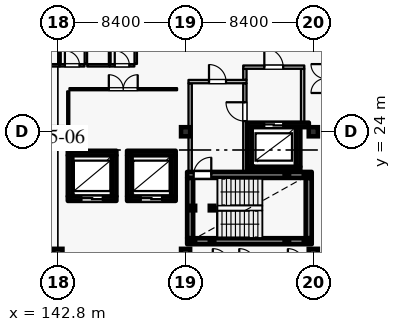
"""IFC4 building model, lengths in metres.
Left out: names, types, materials, properties, quantities, classifications, styles, units other than length and angle.
Written with IfcOpenShell. Run it as: python <this file> out.ifc"""

import sys

from ifc_helpers import new_model, si_unit, direction, frame, frame_2d, origin, origin_2d, place, context, subcontext, project, spatial, rectangle, hollow_rectangle, extrude, element, fill, save


model = new_model("IFC4")
c1 = context("Model", 3, precision=1e-05, world=origin(), true_north=direction((0.0, 1.0)))
c2 = subcontext(c1, "Body", "Model", "MODEL_VIEW")
j1 = project(units=[si_unit("LENGTHUNIT", "METRE"), si_unit("PLANEANGLEUNIT", "RADIAN")], contexts=[c1])
p1 = place(None, origin())
s1 = spatial("IfcSite", under=j1, at=p1, CompositionType="ELEMENT")
p2 = place(p1, origin())
s2 = spatial("IfcBuilding", under=s1, at=p2, CompositionType="ELEMENT")
p3 = place(p2, frame((0.0, 0.0, 39.6)))
s3 = spatial("IfcBuildingStorey", under=s2, at=p3, CompositionType="ELEMENT", Elevation=39.6)
for number, where, z_axis, x_axis in (
    (1, (142.8, 16.0, 0.0), (0.0, 0.0, 1.0), (1.0, 0.0, 0.0)),
    (2, (151.2, 24.0, 0.0), (0.0, 0.0, 1.0), (1.0, 0.0, 0.0)),
    (3, (159.6, 24.0, 0.0), (0.0, 0.0, 1.0), (1.0, 0.0, 0.0)),
    (4, (142.8, 24.0, 0.0), (0.0, 0.0, 1.0), (1.0, 0.0, 0.0)),
    (5, (151.2, 16.0, 0.0), (0.0, 0.0, 1.0), (1.0, 0.0, 0.0)),
    (6, (159.6, 16.0, 0.0), (0.0, 0.0, 1.0), (1.0, 0.0, 0.0)),
):
    element("IfcColumn", number, at=place(p3, frame(where, z_axis=z_axis, x_axis=x_axis)), inside=s3, PredefinedType="COLUMN", context=c2, shape_type="SweptSolid", body=[
        extrude(rectangle(XDim=0.6, YDim=0.6, at=origin_2d()), origin(), (0.0, 0.0, 1.0), 3.6),
    ])
p4 = place(p3, frame((155.25, 21.55, 0.0), z_axis=(0.0, 0.0, 1.0), x_axis=(1.0, 0.0, 0.0)))
e7 = element("IfcWall", 7, at=p4, inside=s3, PredefinedType="SHEAR", context=c2, shape_type="SweptSolid", body=[
    extrude(rectangle(XDim=3.5, YDim=0.3, at=frame_2d((1.75, 0.0))), origin(), (0.0, 0.0, 1.0), 3.335),
])
p5 = place(p3, frame((158.6, 21.705, 0.0), z_axis=(0.0, 0.0, 1.0), x_axis=(0.0, 1.0, 0.0)))
e8 = element("IfcWall", 8, at=p5, inside=s3, PredefinedType="SHEAR", context=c2, shape_type="SweptSolid", body=[
    extrude(rectangle(XDim=2.59, YDim=0.3, at=frame_2d((1.295, 0.0))), origin(), (0.0, 0.0, 1.0), 3.335),
])
p6 = place(p3, frame((159.31, 24.45, 0.0), z_axis=(0.0, 0.0, 1.0), x_axis=(-1.0, 0.0, 0.0)))
e9 = element("IfcWall", 9, at=p6, inside=s3, PredefinedType="SHEAR", context=c2, shape_type="SweptSolid", body=[
    extrude(rectangle(XDim=4.06, YDim=0.3, at=frame_2d((2.03, 0.0))), origin(), (0.0, 0.0, 1.0), 3.335),
])
p7 = place(p6, frame((1.685, 0.0, 0.0)))
e10 = element("IfcOpeningElement", 10, at=p7, cuts=e9, PredefinedType="OPENING", context=c2, shape_type="SweptSolid", body=[
    extrude(rectangle(XDim=1.25, YDim=2.25, at=frame_2d((0.625, 1.125))), frame((0.0, 0.16, 0.0), z_axis=(0.0, -1.0, 0.0), x_axis=(1.0, 0.0, 0.0)), (0.0, 0.0, 1.0), 0.32),
])
p8 = place(p3, frame((155.4, 24.295, 0.0), z_axis=(0.0, 0.0, 1.0), x_axis=(0.0, -1.0, 0.0)))
e11 = element("IfcWall", 11, at=p8, inside=s3, PredefinedType="SHEAR", context=c2, shape_type="SweptSolid", body=[
    extrude(rectangle(XDim=2.59, YDim=0.3, at=frame_2d((1.295, 0.0))), origin(), (0.0, 0.0, 1.0), 3.335),
])
p9 = place(p3, frame((143.45, 19.6, 0.0), z_axis=(0.0, 0.0, 1.0), x_axis=(1.0, 0.0, 0.0)))
e12 = element("IfcWall", 12, at=p9, inside=s3, PredefinedType="SHEAR", context=c2, shape_type="SweptSolid", body=[
    extrude(rectangle(XDim=3.2, YDim=0.3, at=frame_2d((1.6, 0.0))), origin(), (0.0, 0.0, 1.0), 3.335),
])
p10 = place(p9, frame((0.9, 0.0, 0.0)))
e13 = element("IfcOpeningElement", 13, at=p10, cuts=e12, PredefinedType="OPENING", context=c2, shape_type="SweptSolid", body=[
    extrude(rectangle(XDim=1.4, YDim=2.35, at=frame_2d((0.7, 1.175))), frame((0.0, 0.16, 0.0), z_axis=(0.0, -1.0, 0.0), x_axis=(1.0, 0.0, 0.0)), (0.0, 0.0, 1.0), 0.32),
])
p11 = place(p3, frame((146.5, 19.755, 0.0), z_axis=(0.0, 0.0, 1.0), x_axis=(0.0, 1.0, 0.0)))
e14 = element("IfcWall", 14, at=p11, inside=s3, PredefinedType="SHEAR", context=c2, shape_type="SweptSolid", body=[
    extrude(rectangle(XDim=2.69, YDim=0.3, at=frame_2d((1.345, 0.0))), origin(), (0.0, 0.0, 1.0), 3.335),
])
p12 = place(p3, frame((146.65, 22.6, 0.0), z_axis=(0.0, 0.0, 1.0), x_axis=(-1.0, 0.0, 0.0)))
e15 = element("IfcWall", 15, at=p12, inside=s3, PredefinedType="SHEAR", context=c2, shape_type="SweptSolid", body=[
    extrude(rectangle(XDim=3.2, YDim=0.3, at=frame_2d((1.6, 0.0))), origin(), (0.0, 0.0, 1.0), 3.335),
])
p13 = place(p3, frame((143.6, 22.445, 0.0), z_axis=(0.0, 0.0, 1.0), x_axis=(0.0, -1.0, 0.0)))
e16 = element("IfcWall", 16, at=p13, inside=s3, PredefinedType="SHEAR", context=c2, shape_type="SweptSolid", body=[
    extrude(rectangle(XDim=2.69, YDim=0.3, at=frame_2d((1.345, 0.0))), origin(), (0.0, 0.0, 1.0), 3.335),
])
p14 = place(p3, frame((147.35, 19.6, 0.0), z_axis=(0.0, 0.0, 1.0), x_axis=(1.0, 0.0, 0.0)))
e17 = element("IfcWall", 17, at=p14, inside=s3, PredefinedType="SHEAR", context=c2, shape_type="SweptSolid", body=[
    extrude(rectangle(XDim=3.2, YDim=0.3, at=frame_2d((1.6, 0.0))), origin(), (0.0, 0.0, 1.0), 3.335),
])
p15 = place(p14, frame((0.9, 0.0, 0.0)))
e18 = element("IfcOpeningElement", 18, at=p15, cuts=e17, PredefinedType="OPENING", context=c2, shape_type="SweptSolid", body=[
    extrude(rectangle(XDim=1.4, YDim=2.35, at=frame_2d((0.7, 1.175))), frame((0.0, 0.16, 0.0), z_axis=(0.0, -1.0, 0.0), x_axis=(1.0, 0.0, 0.0)), (0.0, 0.0, 1.0), 0.32),
])
p16 = place(p3, frame((150.4, 19.755, 0.0), z_axis=(0.0, 0.0, 1.0), x_axis=(0.0, 1.0, 0.0)))
e19 = element("IfcWall", 19, at=p16, inside=s3, PredefinedType="SHEAR", context=c2, shape_type="SweptSolid", body=[
    extrude(rectangle(XDim=2.69, YDim=0.3, at=frame_2d((1.345, 0.0))), origin(), (0.0, 0.0, 1.0), 3.335),
])
p17 = place(p3, frame((150.55, 22.6, 0.0), z_axis=(0.0, 0.0, 1.0), x_axis=(-1.0, 0.0, 0.0)))
e20 = element("IfcWall", 20, at=p17, inside=s3, PredefinedType="SHEAR", context=c2, shape_type="SweptSolid", body=[
    extrude(rectangle(XDim=3.2, YDim=0.3, at=frame_2d((1.6, 0.0))), origin(), (0.0, 0.0, 1.0), 3.335),
])
p18 = place(p3, frame((147.5, 22.445, 0.0), z_axis=(0.0, 0.0, 1.0), x_axis=(0.0, -1.0, 0.0)))
e21 = element("IfcWall", 21, at=p18, inside=s3, PredefinedType="SHEAR", context=c2, shape_type="SweptSolid", body=[
    extrude(rectangle(XDim=2.69, YDim=0.3, at=frame_2d((1.345, 0.0))), origin(), (0.0, 0.0, 1.0), 3.335),
])
p19 = place(p3, frame((151.3, 16.8, 0.0), z_axis=(0.0, 0.0, 1.0), x_axis=(1.0, 0.0, 0.0)))
e22 = element("IfcWall", 22, at=p19, inside=s3, PredefinedType="SHEAR", context=c2, shape_type="SweptSolid", body=[
    extrude(rectangle(XDim=8.2, YDim=0.4, at=frame_2d((4.1, 0.0))), origin(), (0.0, 0.0, 1.0), 3.335),
])
p20 = place(p3, frame((159.3, 17.005, 0.0), z_axis=(0.0, 0.0, 1.0), x_axis=(0.0, 1.0, 0.0)))
e23 = element("IfcWall", 23, at=p20, inside=s3, PredefinedType="SHEAR", context=c2, shape_type="SweptSolid", body=[
    extrude(rectangle(XDim=3.95, YDim=0.4, at=frame_2d((1.975, 0.0))), origin(), (0.0, 0.0, 1.0), 3.335),
])
p21 = place(p3, frame((151.3, 21.16, 0.0), z_axis=(0.0, 0.0, 1.0), x_axis=(1.0, 0.0, 0.0)))
e24 = element("IfcWall", 24, at=p21, inside=s3, PredefinedType="SHEAR", context=c2, shape_type="SweptSolid", body=[
    extrude(rectangle(XDim=8.2, YDim=0.4, at=frame_2d((4.1, 0.0))), origin(), (0.0, 0.0, 1.0), 3.335),
])
p22 = place(p21, frame((0.43, 0.0, 0.0)))
e25 = element("IfcOpeningElement", 25, at=p22, cuts=e24, PredefinedType="OPENING", context=c2, shape_type="SweptSolid", body=[
    extrude(rectangle(XDim=1.16, YDim=2.2, at=frame_2d((0.58, 1.1))), frame((0.0, 0.21, 0.0), z_axis=(0.0, -1.0, 0.0), x_axis=(1.0, 0.0, 0.0)), (0.0, 0.0, 1.0), 0.42),
])
p23 = place(p3, frame((151.5, 17.005, 0.0), z_axis=(0.0, 0.0, 1.0), x_axis=(0.0, 1.0, 0.0)))
e26 = element("IfcWall", 26, at=p23, inside=s3, PredefinedType="SHEAR", context=c2, shape_type="SweptSolid", body=[
    extrude(rectangle(XDim=3.95, YDim=0.4, at=frame_2d((1.975, 0.0))), origin(), (0.0, 0.0, 1.0), 3.335),
])
p24 = place(p3, frame((151.5, 21.365, 0.0), z_axis=(0.0, 0.0, 1.0), x_axis=(0.0, 1.0, 0.0)))
e27 = element("IfcWall", 27, at=p24, inside=s3, PredefinedType="PARTITIONING", context=c2, shape_type="SweptSolid", body=[
    extrude(rectangle(XDim=5.82, YDim=0.22, at=frame_2d((2.91, 0.0))), origin(), (0.0, 0.0, 1.0), 3.335),
])
p25 = place(p3, frame((151.39, 27.3, 0.0), z_axis=(0.0, 0.0, 1.0), x_axis=(1.0, 0.0, 0.0)))
e28 = element("IfcWall", 28, at=p25, inside=s3, PredefinedType="PARTITIONING", context=c2, shape_type="SweptSolid", body=[
    extrude(rectangle(XDim=3.82, YDim=0.22, at=frame_2d((1.91, 0.0))), origin(), (0.0, 0.0, 1.0), 3.335),
])
p26 = place(p25, frame((1.35, 0.0, 0.0)))
e29 = element("IfcOpeningElement", 29, at=p26, cuts=e28, PredefinedType="OPENING", context=c2, shape_type="SweptSolid", body=[
    extrude(rectangle(XDim=1.12, YDim=2.2, at=frame_2d((0.56, 1.1))), frame((0.0, 0.12, 0.0), z_axis=(0.0, -1.0, 0.0), x_axis=(1.0, 0.0, 0.0)), (0.0, 0.0, 1.0), 0.24),
])
p27 = place(p3, frame((155.1, 21.365, 0.0), z_axis=(0.0, 0.0, 1.0), x_axis=(0.0, 1.0, 0.0)))
e30 = element("IfcWall", 30, at=p27, inside=s3, PredefinedType="PARTITIONING", context=c2, shape_type="SweptSolid", body=[
    extrude(rectangle(XDim=5.82, YDim=0.22, at=frame_2d((2.91, 0.0))), origin(), (0.0, 0.0, 1.0), 3.335),
])
p28 = place(p27, frame((3.335, 0.0, 0.0)))
e31 = element("IfcOpeningElement", 31, at=p28, cuts=e30, PredefinedType="OPENING", context=c2, shape_type="SweptSolid", body=[
    extrude(rectangle(XDim=1.24, YDim=2.2, at=frame_2d((0.62, 1.1))), frame((0.0, 0.12, 0.0), z_axis=(0.0, -1.0, 0.0), x_axis=(1.0, 0.0, 0.0)), (0.0, 0.0, 1.0), 0.24),
])
p29 = place(p3, frame((155.1, 27.415, 0.0), z_axis=(0.0, 0.0, 1.0), x_axis=(0.0, 1.0, 0.0)))
e32 = element("IfcWall", 32, at=p29, inside=s3, PredefinedType="PARTITIONING", context=c2, shape_type="SweptSolid", body=[
    extrude(rectangle(XDim=0.72, YDim=0.22, at=frame_2d((0.36, 0.0))), origin(), (0.0, 0.0, 1.0), 3.335),
])
p30 = place(p3, frame((158.9, 24.605, 0.0), z_axis=(0.0, 0.0, 1.0), x_axis=(0.0, 1.0, 0.0)))
e33 = element("IfcWall", 33, at=p30, inside=s3, PredefinedType="PARTITIONING", context=c2, shape_type="SweptSolid", body=[
    extrude(rectangle(XDim=3.53, YDim=0.22, at=frame_2d((1.765, 0.0))), origin(), (0.0, 0.0, 1.0), 3.335),
])
p31 = place(p3, frame((154.99, 28.25, 0.0), z_axis=(0.0, 0.0, 1.0), x_axis=(1.0, 0.0, 0.0)))
e34 = element("IfcWall", 34, at=p31, inside=s3, PredefinedType="PARTITIONING", context=c2, shape_type="SweptSolid", body=[
    extrude(rectangle(XDim=4.02, YDim=0.22, at=frame_2d((2.01, 0.0))), origin(), (0.0, 0.0, 1.0), 3.335),
])
p32 = place(p31, frame((1.39, 0.0, 0.0)))
e35 = element("IfcOpeningElement", 35, at=p32, cuts=e34, PredefinedType="OPENING", context=c2, shape_type="SweptSolid", body=[
    extrude(rectangle(XDim=1.24, YDim=2.2, at=frame_2d((0.62, 1.1))), frame((0.0, 0.12, 0.0), z_axis=(0.0, -1.0, 0.0), x_axis=(1.0, 0.0, 0.0)), (0.0, 0.0, 1.0), 0.24),
])
for number, where, z_axis, x_axis in (
    (36, (151.68, 16.8, 0.0), (0.0, 0.0, 1.0), (1.0, 0.0, 0.0)),
    (37, (151.68, 18.98, 0.0), (0.0, 0.0, 1.0), (1.0, 0.0, 0.0)),
    (38, (152.94, 16.8, 0.0), (0.0, 0.0, 1.0), (1.0, 0.0, 0.0)),
    (39, (152.94, 18.98, 0.0), (0.0, 0.0, 1.0), (1.0, 0.0, 0.0)),
    (40, (157.86, 16.8, -1.8), (0.0, 0.0, 1.0), (1.0, 0.0, 0.0)),
    (41, (157.86, 21.16, -1.8), (0.0, 0.0, 1.0), (1.0, 0.0, 0.0)),
    (42, (159.12, 16.8, -1.8), (0.0, 0.0, 1.0), (1.0, 0.0, 0.0)),
    (43, (159.12, 21.16, -1.8), (0.0, 0.0, 1.0), (1.0, 0.0, 0.0)),
):
    element("IfcColumn", number, at=place(p3, frame(where, z_axis=z_axis, x_axis=x_axis)), inside=s3, PredefinedType="COLUMN", context=c2, shape_type="SweptSolid", body=[
        extrude(hollow_rectangle(XDim=0.3, YDim=0.3, WallThickness=0.012, at=origin_2d()), origin(), (0.0, 0.0, 1.0), 3.42),
    ])
p33 = place(p3, frame((141.45, 28.37, 0.0), z_axis=(0.0, 0.0, 1.0), x_axis=(1.0, 0.0, 0.0)))
e44 = element("IfcWall", 44, at=p33, inside=s3, PredefinedType="PARTITIONING", context=c2, shape_type="SweptSolid", body=[
    extrude(rectangle(XDim=1.47, YDim=0.16, at=frame_2d((0.735, 0.0))), origin(), (0.0, 0.0, 1.0), 3.335),
])
p34 = place(p3, frame((142.93, 28.37, 0.0), z_axis=(0.0, 0.0, 1.0), x_axis=(1.0, 0.0, 0.0)))
e45 = element("IfcWall", 45, at=p34, inside=s3, PredefinedType="PARTITIONING", context=c2, shape_type="SweptSolid", body=[
    extrude(rectangle(XDim=1.62, YDim=0.16, at=frame_2d((0.81, 0.0))), origin(), (0.0, 0.0, 1.0), 3.335),
])
p35 = place(p34, frame((0.33, 0.0, 0.0)))
e46 = element("IfcOpeningElement", 46, at=p35, cuts=e45, PredefinedType="OPENING", context=c2, shape_type="SweptSolid", body=[
    extrude(rectangle(XDim=0.96, YDim=2.2, at=frame_2d((0.48, 1.1))), frame((0.0, 0.09, 0.0), z_axis=(0.0, -1.0, 0.0), x_axis=(1.0, 0.0, 0.0)), (0.0, 0.0, 1.0), 0.18),
])
p36 = place(p3, frame((142.93, 28.46, 0.0), z_axis=(0.0, 0.0, 1.0), x_axis=(0.0, 1.0, 0.0)))
e47 = element("IfcWall", 47, at=p36, inside=s3, PredefinedType="PARTITIONING", context=c2, shape_type="SweptSolid", body=[
    extrude(rectangle(XDim=1.74, YDim=0.115, at=frame_2d((0.87, 0.0))), origin(), (0.0, 0.0, 1.0), 2.74),
])
p37 = place(p3, frame((144.73, 28.37, 0.0), z_axis=(0.0, 0.0, 1.0), x_axis=(1.0, 0.0, 0.0)))
e48 = element("IfcWall", 48, at=p37, inside=s3, PredefinedType="PARTITIONING", context=c2, shape_type="SweptSolid", body=[
    extrude(rectangle(XDim=1.47, YDim=0.16, at=frame_2d((0.735, 0.0))), origin(), (0.0, 0.0, 1.0), 3.335),
])
p38 = place(p3, frame((146.21, 28.37, 0.0), z_axis=(0.0, 0.0, 1.0), x_axis=(1.0, 0.0, 0.0)))
e49 = element("IfcWall", 49, at=p38, inside=s3, PredefinedType="PARTITIONING", context=c2, shape_type="SweptSolid", body=[
    extrude(rectangle(XDim=1.62, YDim=0.16, at=frame_2d((0.81, 0.0))), origin(), (0.0, 0.0, 1.0), 3.335),
])
p39 = place(p38, frame((0.33, 0.0, 0.0)))
e50 = element("IfcOpeningElement", 50, at=p39, cuts=e49, PredefinedType="OPENING", context=c2, shape_type="SweptSolid", body=[
    extrude(rectangle(XDim=0.96, YDim=2.2, at=frame_2d((0.48, 1.1))), frame((0.0, 0.09, 0.0), z_axis=(0.0, -1.0, 0.0), x_axis=(1.0, 0.0, 0.0)), (0.0, 0.0, 1.0), 0.18),
])
p40 = place(p3, frame((146.21, 28.46, 0.0), z_axis=(0.0, 0.0, 1.0), x_axis=(0.0, 1.0, 0.0)))
e51 = element("IfcWall", 51, at=p40, inside=s3, PredefinedType="PARTITIONING", context=c2, shape_type="SweptSolid", body=[
    extrude(rectangle(XDim=2.45, YDim=0.115, at=frame_2d((1.225, 0.0))), origin(), (0.0, 0.0, 1.0), 3.335),
])
p41 = place(p3, frame((144.64, 28.46, 0.0), z_axis=(0.0, 0.0, 1.0), x_axis=(0.0, 1.0, 0.0)))
e52 = element("IfcWall", 52, at=p41, inside=s3, PredefinedType="PARTITIONING", context=c2, shape_type="SweptSolid", body=[
    extrude(rectangle(XDim=4.95, YDim=0.16, at=frame_2d((2.475, 0.0))), origin(), (0.0, 0.0, 1.0), 3.335),
])
p42 = place(p3, frame((147.92, 28.46, 0.0), z_axis=(0.0, 0.0, 1.0), x_axis=(0.0, 1.0, 0.0)))
e53 = element("IfcWall", 53, at=p42, inside=s3, PredefinedType="PARTITIONING", context=c2, shape_type="SweptSolid", body=[
    extrude(rectangle(XDim=4.44, YDim=0.16, at=frame_2d((2.22, 0.0))), origin(), (0.0, 0.0, 1.0), 3.335),
])
p43 = place(p3, frame((143.56, 26.8, 0.0), z_axis=(0.0, 0.0, 1.0), x_axis=(1.0, 0.0, 0.0)))
e54 = element("IfcWall", 54, at=p43, inside=s3, PredefinedType="PARTITIONING", context=c2, shape_type="SweptSolid", body=[
    extrude(rectangle(XDim=7.08, YDim=0.14, at=frame_2d((3.54, 0.0))), origin(), (0.0, 0.0, 1.0), 3.335),
])
p44 = place(p43, frame((2.59, 0.0, 0.0)))
e55 = element("IfcOpeningElement", 55, at=p44, cuts=e54, PredefinedType="OPENING", context=c2, shape_type="SweptSolid", body=[
    extrude(rectangle(XDim=1.9, YDim=2.4, at=frame_2d((0.95, 1.2))), frame((0.0, 0.08, 0.0), z_axis=(0.0, -1.0, 0.0), x_axis=(1.0, 0.0, 0.0)), (0.0, 0.0, 1.0), 0.16),
])
p45 = place(p3, frame((143.48, 23.45, 0.0), z_axis=(0.0, 0.0, 1.0), x_axis=(0.0, 1.0, 0.0)))
e56 = element("IfcWall", 56, at=p45, inside=s3, PredefinedType="PARTITIONING", context=c2, shape_type="SweptSolid", body=[
    extrude(rectangle(XDim=3.21, YDim=0.14, at=frame_2d((1.605, 0.0))), origin(), (0.0, 0.0, 1.0), 3.335),
])
p46 = place(p7, origin())
e57 = element("IfcDoor", 57, at=p46, inside=s3, OperationType="DOUBLE_DOOR_SLIDING", PredefinedType="DOOR", context=c2, shape_type="SweptSolid", body=[
    extrude(rectangle(XDim=1.25, YDim=2.25, at=frame_2d((0.625, 1.125))), frame((0.0, 0.025, 0.0), z_axis=(0.0, -1.0, 0.0), x_axis=(1.0, 0.0, 0.0)), (0.0, 0.0, 1.0), 0.05),
])
fill(e10, e57)
p47 = place(p10, origin())
e58 = element("IfcDoor", 58, at=p47, inside=s3, OperationType="DOUBLE_DOOR_SLIDING", PredefinedType="DOOR", context=c2, shape_type="SweptSolid", body=[
    extrude(rectangle(XDim=1.4, YDim=2.35, at=frame_2d((0.7, 1.175))), frame((0.0, 0.025, 0.0), z_axis=(0.0, -1.0, 0.0), x_axis=(1.0, 0.0, 0.0)), (0.0, 0.0, 1.0), 0.05),
])
fill(e13, e58)
p48 = place(p15, origin())
e59 = element("IfcDoor", 59, at=p48, inside=s3, OperationType="DOUBLE_DOOR_SLIDING", PredefinedType="DOOR", context=c2, shape_type="SweptSolid", body=[
    extrude(rectangle(XDim=1.4, YDim=2.35, at=frame_2d((0.7, 1.175))), frame((0.0, 0.025, 0.0), z_axis=(0.0, -1.0, 0.0), x_axis=(1.0, 0.0, 0.0)), (0.0, 0.0, 1.0), 0.05),
])
fill(e18, e59)
p49 = place(p22, origin())
e60 = element("IfcDoor", 60, at=p49, inside=s3, OperationType="SINGLE_SWING_RIGHT", PredefinedType="DOOR", context=c2, shape_type="SweptSolid", body=[
    extrude(rectangle(XDim=1.16, YDim=2.2, at=frame_2d((0.58, 1.1))), frame((0.0, 0.025, 0.0), z_axis=(0.0, -1.0, 0.0), x_axis=(1.0, 0.0, 0.0)), (0.0, 0.0, 1.0), 0.05),
])
fill(e25, e60)
p50 = place(p26, origin())
e61 = element("IfcDoor", 61, at=p50, inside=s3, OperationType="SINGLE_SWING_LEFT", PredefinedType="DOOR", context=c2, shape_type="SweptSolid", body=[
    extrude(rectangle(XDim=1.12, YDim=2.2, at=frame_2d((0.56, 1.1))), frame((0.0, 0.025, 0.0), z_axis=(0.0, -1.0, 0.0), x_axis=(1.0, 0.0, 0.0)), (0.0, 0.0, 1.0), 0.05),
])
fill(e29, e61)
p51 = place(p28, origin())
e62 = element("IfcDoor", 62, at=p51, inside=s3, OperationType="SINGLE_SWING_RIGHT", PredefinedType="DOOR", context=c2, shape_type="SweptSolid", body=[
    extrude(rectangle(XDim=1.24, YDim=2.2, at=frame_2d((0.62, 1.1))), frame((0.0, 0.025, 0.0), z_axis=(0.0, -1.0, 0.0), x_axis=(1.0, 0.0, 0.0)), (0.0, 0.0, 1.0), 0.05),
])
fill(e31, e62)
p52 = place(p32, origin())
e63 = element("IfcDoor", 63, at=p52, inside=s3, OperationType="SINGLE_SWING_LEFT", PredefinedType="DOOR", context=c2, shape_type="SweptSolid", body=[
    extrude(rectangle(XDim=1.24, YDim=2.2, at=frame_2d((0.62, 1.1))), frame((0.0, 0.025, 0.0), z_axis=(0.0, -1.0, 0.0), x_axis=(1.0, 0.0, 0.0)), (0.0, 0.0, 1.0), 0.05),
])
fill(e35, e63)
p53 = place(p35, origin())
e64 = element("IfcDoor", 64, at=p53, inside=s3, OperationType="SINGLE_SWING_LEFT", PredefinedType="DOOR", context=c2, shape_type="SweptSolid", body=[
    extrude(rectangle(XDim=0.96, YDim=2.2, at=frame_2d((0.48, 1.1))), frame((0.0, 0.025, 0.0), z_axis=(0.0, -1.0, 0.0), x_axis=(1.0, 0.0, 0.0)), (0.0, 0.0, 1.0), 0.05),
])
fill(e46, e64)
p54 = place(p39, origin())
e65 = element("IfcDoor", 65, at=p54, inside=s3, OperationType="SINGLE_SWING_LEFT", PredefinedType="DOOR", context=c2, shape_type="SweptSolid", body=[
    extrude(rectangle(XDim=0.96, YDim=2.2, at=frame_2d((0.48, 1.1))), frame((0.0, 0.025, 0.0), z_axis=(0.0, -1.0, 0.0), x_axis=(1.0, 0.0, 0.0)), (0.0, 0.0, 1.0), 0.05),
])
fill(e50, e65)
p55 = place(p44, origin())
e66 = element("IfcDoor", 66, at=p55, inside=s3, OperationType="DOUBLE_DOOR_SINGLE_SWING", PredefinedType="DOOR", context=c2, shape_type="SweptSolid", body=[
    extrude(rectangle(XDim=1.9, YDim=2.4, at=frame_2d((0.95, 1.2))), frame((0.0, 0.025, 0.0), z_axis=(0.0, -1.0, 0.0), x_axis=(1.0, 0.0, 0.0)), (0.0, 0.0, 1.0), 0.05),
])
fill(e55, e66)
save(model, sys.argv[1])
